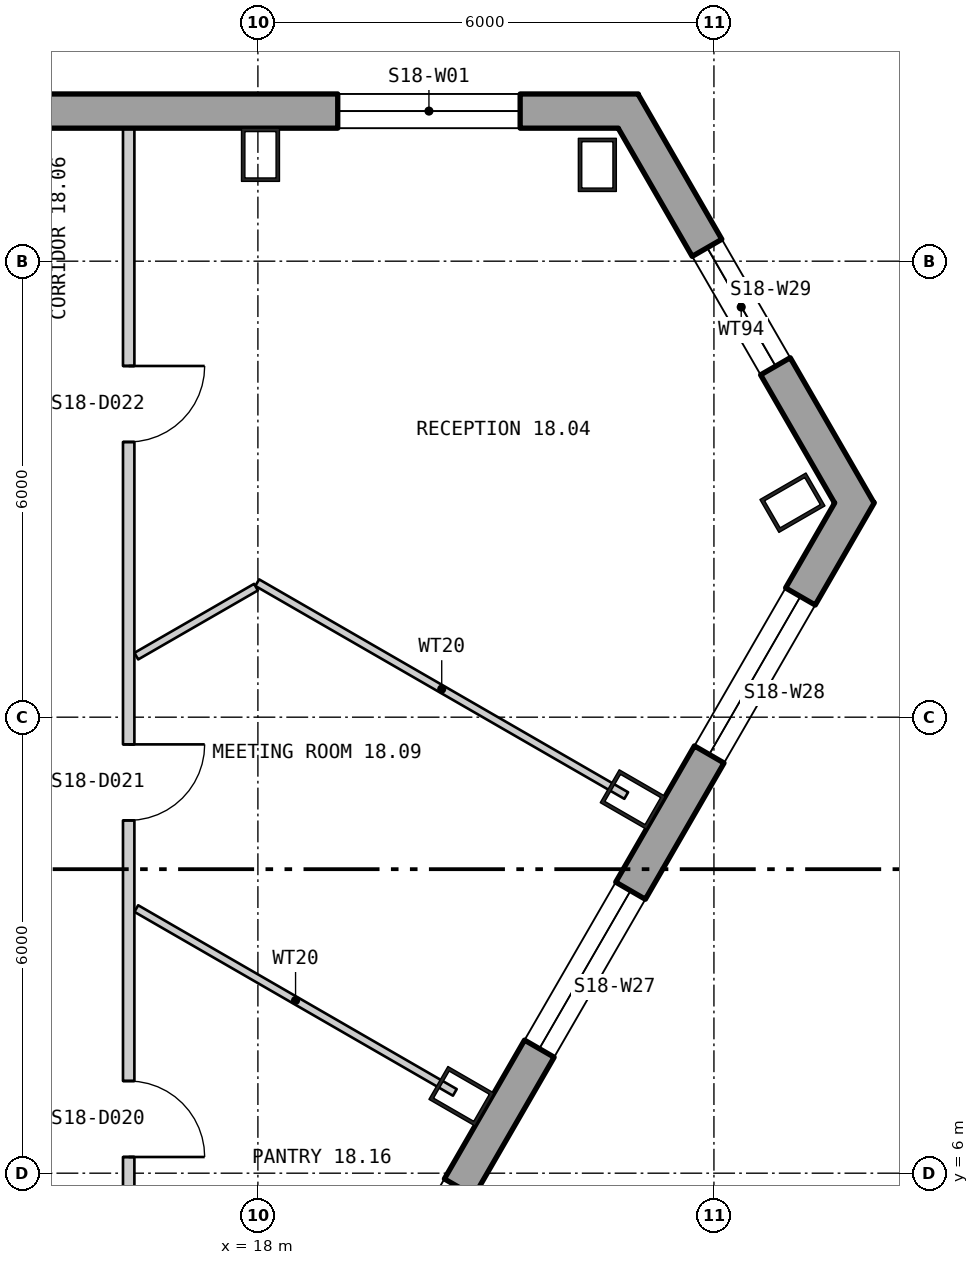
"""IFC4 building model, lengths in metres.
Left out: names, types, materials, properties, quantities, classifications, styles, units other than length and angle.
Written with IfcOpenShell. Run it as: python <this file> out.ifc"""

import sys

from ifc_helpers import new_model, si_unit, direction, frame, frame_2d, origin, origin_2d, place, context, subcontext, project, spatial, polyline, rectangle, hollow_rectangle, outline, extrude, element, fill, save


model = new_model("IFC4")
c1 = context("Model", 3, precision=1e-05, world=origin(), true_north=direction((0.0, 1.0)))
c2 = subcontext(c1, "Body", "Model", "MODEL_VIEW")
j1 = project(units=[si_unit("LENGTHUNIT", "METRE"), si_unit("PLANEANGLEUNIT", "RADIAN")], contexts=[c1])
p1 = place(None, origin())
s1 = spatial("IfcSite", under=j1, at=p1, CompositionType="ELEMENT")
p2 = place(p1, origin())
s2 = spatial("IfcBuilding", under=s1, at=p2, CompositionType="ELEMENT")
p3 = place(p2, frame((0.0, 0.0, 245.4)))
s3 = spatial("IfcBuildingStorey", under=s2, at=p3, CompositionType="ELEMENT", Elevation=245.4)
for number, where, z_axis, x_axis in (
    (1, (22.466, 19.267, 0.0), (0.0, 0.0, 1.0), (-1.0, 0.0, 0.0)),
    (2, (18.034, 19.4, 0.0), (0.0, 0.0, 1.0), (-1.0, 0.0, 0.0)),
    (3, (20.678, 7.013, 0.0), (0.0, 0.0, 1.0), (0.5, 0.866, 0.0)),
    (4, (22.932, 10.917, 0.0), (0.0, 0.0, 1.0), (0.5, 0.866, 0.0)),
    (5, (25.033, 14.822, 0.0), (0.0, 0.0, 1.0), (-0.5, 0.866, 0.0)),
):
    element("IfcColumn", number, at=place(p3, frame(where, z_axis=z_axis, x_axis=x_axis)), inside=s3, PredefinedType="COLUMN", context=c2, shape_type="SweptSolid", body=[
        extrude(hollow_rectangle(XDim=0.5, YDim=0.7, WallThickness=0.045, at=origin_2d()), origin(), (0.0, 0.0, 1.0), 3.9),
    ])
p4 = place(p3, frame((22.875, 19.975, -0.4), z_axis=(0.0, 0.0, 1.0), x_axis=(-1.0, 0.0, 0.0)))
e6 = element("IfcWall", 6, at=p4, inside=s3, PredefinedType="SOLIDWALL", context=c2, shape_type="SweptSolid", body=[
    extrude(outline(polyline([(-0.13, -0.225), (45.88, -0.225), (45.62, 0.225), (0.13, 0.225), (-0.13, -0.225)])), origin(), (0.0, 0.0, 1.0), 3.9),
])
p5 = place(p4, frame((1.425, 0.0, 1.3)))
e7 = element("IfcOpeningElement", 7, at=p5, cuts=e6, PredefinedType="OPENING", context=c2, shape_type="SweptSolid", body=[
    extrude(rectangle(XDim=2.4, YDim=2.0, at=frame_2d((1.2, 1.0))), frame((0.0, 0.235, 0.0), z_axis=(0.0, -1.0, 0.0), x_axis=(1.0, 0.0, 0.0)), (0.0, 0.0, 1.0), 0.47),
])
p6 = place(p4, frame((14.912, 0.0, 1.3)))
e8 = element("IfcOpeningElement", 8, at=p6, cuts=e6, PredefinedType="OPENING", context=c2, shape_type="SweptSolid", body=[
    extrude(rectangle(XDim=2.4, YDim=2.0, at=frame_2d((1.2, 1.0))), frame((0.0, 0.235, 0.0), z_axis=(0.0, -1.0, 0.0), x_axis=(1.0, 0.0, 0.0)), (0.0, 0.0, 1.0), 0.47),
])
p7 = place(p4, frame((19.421, 0.0, 1.3)))
e9 = element("IfcOpeningElement", 9, at=p7, cuts=e6, PredefinedType="OPENING", context=c2, shape_type="SweptSolid", body=[
    extrude(rectangle(XDim=2.4, YDim=2.0, at=frame_2d((1.2, 1.0))), frame((0.0, 0.235, 0.0), z_axis=(0.0, -1.0, 0.0), x_axis=(1.0, 0.0, 0.0)), (0.0, 0.0, 1.0), 0.47),
])
p8 = place(p4, frame((23.929, 0.0, 1.3)))
e10 = element("IfcOpeningElement", 10, at=p8, cuts=e6, PredefinedType="OPENING", context=c2, shape_type="SweptSolid", body=[
    extrude(rectangle(XDim=2.4, YDim=2.0, at=frame_2d((1.2, 1.0))), frame((0.0, 0.235, 0.0), z_axis=(0.0, -1.0, 0.0), x_axis=(1.0, 0.0, 0.0)), (0.0, 0.0, 1.0), 0.47),
])
p9 = place(p4, frame((28.438, 0.0, 1.3)))
e11 = element("IfcOpeningElement", 11, at=p9, cuts=e6, PredefinedType="OPENING", context=c2, shape_type="SweptSolid", body=[
    extrude(rectangle(XDim=2.4, YDim=2.0, at=frame_2d((1.2, 1.0))), frame((0.0, 0.235, 0.0), z_axis=(0.0, -1.0, 0.0), x_axis=(1.0, 0.0, 0.0)), (0.0, 0.0, 1.0), 0.47),
])
p10 = place(p4, frame((32.947, 0.0, 1.3)))
e12 = element("IfcOpeningElement", 12, at=p10, cuts=e6, PredefinedType="OPENING", context=c2, shape_type="SweptSolid", body=[
    extrude(rectangle(XDim=2.4, YDim=2.0, at=frame_2d((1.2, 1.0))), frame((0.0, 0.235, 0.0), z_axis=(0.0, -1.0, 0.0), x_axis=(1.0, 0.0, 0.0)), (0.0, 0.0, 1.0), 0.47),
])
p11 = place(p4, frame((41.925, 0.0, 1.3)))
e13 = element("IfcOpeningElement", 13, at=p11, cuts=e6, PredefinedType="OPENING", context=c2, shape_type="SweptSolid", body=[
    extrude(rectangle(XDim=2.4, YDim=2.0, at=frame_2d((1.2, 1.0))), frame((0.0, 0.235, 0.0), z_axis=(0.0, -1.0, 0.0), x_axis=(1.0, 0.0, 0.0)), (0.0, 0.0, 1.0), 0.47),
])
p12 = place(p3, frame((2.975, -24.799, -0.18), z_axis=(0.0, 0.0, 1.0), x_axis=(0.500000335318, 0.866025210188, 0.0)))
e14 = element("IfcWall", 14, at=p12, inside=s3, PredefinedType="SOLIDWALL", context=c2, shape_type="SweptSolid", body=[
    extrude(outline(polyline([(-0.13, -0.225), (45.88, -0.225), (45.62, 0.225), (0.13, 0.225), (-0.13, -0.225)])), origin(), (0.0, 0.0, 1.0), 3.68),
])
p13 = place(p12, frame((1.425, 0.0, 1.08)))
e15 = element("IfcOpeningElement", 15, at=p13, cuts=e14, PredefinedType="OPENING", context=c2, shape_type="SweptSolid", body=[
    extrude(rectangle(XDim=2.4, YDim=2.0, at=frame_2d((1.2, 1.0))), frame((0.0, 0.235, 0.0), z_axis=(0.0, -1.0, 0.0), x_axis=(1.0, 0.0, 0.0)), (0.0, 0.0, 1.0), 0.47),
])
p14 = place(p12, frame((5.895, 0.0, 1.08)))
e16 = element("IfcOpeningElement", 16, at=p14, cuts=e14, PredefinedType="OPENING", context=c2, shape_type="SweptSolid", body=[
    extrude(rectangle(XDim=2.4, YDim=2.0, at=frame_2d((1.2, 1.0))), frame((0.0, 0.235, 0.0), z_axis=(0.0, -1.0, 0.0), x_axis=(1.0, 0.0, 0.0)), (0.0, 0.0, 1.0), 0.47),
])
p15 = place(p12, frame((10.403, 0.0, 1.08)))
e17 = element("IfcOpeningElement", 17, at=p15, cuts=e14, PredefinedType="OPENING", context=c2, shape_type="SweptSolid", body=[
    extrude(rectangle(XDim=2.4, YDim=2.0, at=frame_2d((1.2, 1.0))), frame((0.0, 0.235, 0.0), z_axis=(0.0, -1.0, 0.0), x_axis=(1.0, 0.0, 0.0)), (0.0, 0.0, 1.0), 0.47),
])
p16 = place(p12, frame((14.912, 0.0, 1.08)))
e18 = element("IfcOpeningElement", 18, at=p16, cuts=e14, PredefinedType="OPENING", context=c2, shape_type="SweptSolid", body=[
    extrude(rectangle(XDim=2.4, YDim=2.0, at=frame_2d((1.2, 1.0))), frame((0.0, 0.235, 0.0), z_axis=(0.0, -1.0, 0.0), x_axis=(1.0, 0.0, 0.0)), (0.0, 0.0, 1.0), 0.47),
])
p17 = place(p12, frame((19.421, 0.0, 1.08)))
e19 = element("IfcOpeningElement", 19, at=p17, cuts=e14, PredefinedType="OPENING", context=c2, shape_type="SweptSolid", body=[
    extrude(rectangle(XDim=2.4, YDim=2.0, at=frame_2d((1.2, 1.0))), frame((0.0, 0.235, 0.0), z_axis=(0.0, -1.0, 0.0), x_axis=(1.0, 0.0, 0.0)), (0.0, 0.0, 1.0), 0.47),
])
p18 = place(p12, frame((23.929, 0.0, 1.08)))
e20 = element("IfcOpeningElement", 20, at=p18, cuts=e14, PredefinedType="OPENING", context=c2, shape_type="SweptSolid", body=[
    extrude(rectangle(XDim=2.4, YDim=2.0, at=frame_2d((1.2, 1.0))), frame((0.0, 0.235, 0.0), z_axis=(0.0, -1.0, 0.0), x_axis=(1.0, 0.0, 0.0)), (0.0, 0.0, 1.0), 0.47),
])
p19 = place(p12, frame((28.438, 0.0, 1.08)))
e21 = element("IfcOpeningElement", 21, at=p19, cuts=e14, PredefinedType="OPENING", context=c2, shape_type="SweptSolid", body=[
    extrude(rectangle(XDim=2.4, YDim=2.0, at=frame_2d((1.2, 1.0))), frame((0.0, 0.235, 0.0), z_axis=(0.0, -1.0, 0.0), x_axis=(1.0, 0.0, 0.0)), (0.0, 0.0, 1.0), 0.47),
])
p20 = place(p12, frame((32.947, 0.0, 1.08)))
e22 = element("IfcOpeningElement", 22, at=p20, cuts=e14, PredefinedType="OPENING", context=c2, shape_type="SweptSolid", body=[
    extrude(rectangle(XDim=2.4, YDim=2.0, at=frame_2d((1.2, 1.0))), frame((0.0, 0.235, 0.0), z_axis=(0.0, -1.0, 0.0), x_axis=(1.0, 0.0, 0.0)), (0.0, 0.0, 1.0), 0.47),
])
p21 = place(p12, frame((37.455, 0.0, 1.08)))
e23 = element("IfcOpeningElement", 23, at=p21, cuts=e14, PredefinedType="OPENING", context=c2, shape_type="SweptSolid", body=[
    extrude(rectangle(XDim=2.4, YDim=2.0, at=frame_2d((1.2, 1.0))), frame((0.0, 0.235, 0.0), z_axis=(0.0, -1.0, 0.0), x_axis=(1.0, 0.0, 0.0)), (0.0, 0.0, 1.0), 0.47),
])
p22 = place(p12, frame((41.925, 0.0, 1.08)))
e24 = element("IfcOpeningElement", 24, at=p22, cuts=e14, PredefinedType="OPENING", context=c2, shape_type="SweptSolid", body=[
    extrude(rectangle(XDim=2.4, YDim=2.0, at=frame_2d((1.2, 1.0))), frame((0.0, 0.235, 0.0), z_axis=(0.0, -1.0, 0.0), x_axis=(1.0, 0.0, 0.0)), (0.0, 0.0, 1.0), 0.47),
])
p23 = place(p3, frame((25.846, 14.82, -0.4), z_axis=(0.0, 0.0, 1.0), x_axis=(-0.500001772576, 0.866024380385, 0.0)))
e25 = element("IfcWall", 25, at=p23, inside=s3, PredefinedType="SOLIDWALL", context=c2, shape_type="SweptSolid", body=[
    extrude(outline(polyline([(-0.13, -0.225), (6.08, -0.225), (5.82, 0.225), (0.13, 0.225), (-0.13, -0.225)])), origin(), (0.0, 0.0, 1.0), 3.9),
])
p24 = place(p23, frame((2.075, 0.0, 1.3)))
e26 = element("IfcOpeningElement", 26, at=p24, cuts=e25, PredefinedType="OPENING", context=c2, shape_type="SweptSolid", body=[
    extrude(rectangle(XDim=1.8, YDim=2.0, at=frame_2d((0.9, 1.0))), frame((0.0, 0.235, 0.0), z_axis=(0.0, -1.0, 0.0), x_axis=(1.0, 0.0, 0.0)), (0.0, 0.0, 1.0), 0.47),
])
p25 = place(p3, frame((16.3, 2.125, 0.0), z_axis=(0.0, 0.0, 1.0), x_axis=(0.0, 1.0, 0.0)))
e27 = element("IfcWall", 27, at=p25, inside=s3, PredefinedType="PARTITIONING", context=c2, shape_type="SweptSolid", body=[
    extrude(rectangle(XDim=17.622, YDim=0.15, at=frame_2d((8.811, 0.0))), origin(), (0.0, 0.0, 1.0), 3.7),
])
p26 = place(p25, frame((4.088, 0.0, 0.0)))
e28 = element("IfcOpeningElement", 28, at=p26, cuts=e27, PredefinedType="OPENING", context=c2, shape_type="SweptSolid", body=[
    extrude(rectangle(XDim=1.0, YDim=2.1, at=frame_2d((0.5, 1.05))), frame((0.0, 0.085, 0.0), z_axis=(0.0, -1.0, 0.0), x_axis=(1.0, 0.0, 0.0)), (0.0, 0.0, 1.0), 0.17),
])
p27 = place(p25, frame((8.517, 0.0, 0.0)))
e29 = element("IfcOpeningElement", 29, at=p27, cuts=e27, PredefinedType="OPENING", context=c2, shape_type="SweptSolid", body=[
    extrude(rectangle(XDim=1.0, YDim=2.1, at=frame_2d((0.5, 1.05))), frame((0.0, 0.085, 0.0), z_axis=(0.0, -1.0, 0.0), x_axis=(1.0, 0.0, 0.0)), (0.0, 0.0, 1.0), 0.17),
])
p28 = place(p25, frame((13.496, 0.0, 0.0)))
e30 = element("IfcOpeningElement", 30, at=p28, cuts=e27, PredefinedType="OPENING", context=c2, shape_type="SweptSolid", body=[
    extrude(rectangle(XDim=1.0, YDim=2.1, at=frame_2d((0.5, 1.05))), frame((0.0, 0.085, 0.0), z_axis=(0.0, -1.0, 0.0), x_axis=(1.0, 0.0, 0.0)), (0.0, 0.0, 1.0), 0.17),
])
p29 = place(p3, frame((16.4, 12.803, 0.0), z_axis=(0.0, 0.0, 1.0), x_axis=(0.866341220787, 0.499452589508, 0.0)))
e31 = element("IfcWall", 31, at=p29, inside=s3, PredefinedType="PARTITIONING", context=c2, shape_type="SweptSolid", body=[
    extrude(rectangle(XDim=1.818, YDim=0.1, at=frame_2d((0.909, 0.0))), origin(), (0.0, 0.0, 1.0), 3.7),
])
p30 = place(p3, frame((16.4, 9.482, 0.0), z_axis=(0.0, 0.0, 1.0), x_axis=(0.866085797004, -0.499895381282, 0.0)))
e32 = element("IfcWall", 32, at=p30, inside=s3, PredefinedType="PARTITIONING", context=c2, shape_type="SweptSolid", body=[
    extrude(rectangle(XDim=4.839, YDim=0.1, at=frame_2d((2.42, 0.0))), origin(), (0.0, 0.0, 1.0), 3.7),
])
p31 = place(p3, frame((17.991, 13.77, 0.0), z_axis=(0.0, 0.0, 1.0), x_axis=(0.866182615826, -0.499727601839, 0.0)))
e33 = element("IfcWall", 33, at=p31, inside=s3, PredefinedType="PARTITIONING", context=c2, shape_type="SweptSolid", body=[
    extrude(rectangle(XDim=5.605, YDim=0.1, at=frame_2d((2.803, 0.0))), origin(), (0.0, 0.0, 1.0), 3.7),
])
p32 = place(p5, origin())
e34 = element("IfcWindow", 34, at=p32, inside=s3, PartitioningType="SINGLE_PANEL", PredefinedType="WINDOW", context=c2, shape_type="SweptSolid", body=[
    extrude(rectangle(XDim=2.4, YDim=2.0, at=frame_2d((1.2, 1.0))), frame((0.0, 0.105, 0.0), z_axis=(0.0, -1.0, 0.0), x_axis=(1.0, 0.0, 0.0)), (0.0, 0.0, 1.0), 0.06),
])
fill(e7, e34)
p33 = place(p20, origin())
e35 = element("IfcWindow", 35, at=p33, inside=s3, PartitioningType="SINGLE_PANEL", PredefinedType="WINDOW", context=c2, shape_type="SweptSolid", body=[
    extrude(rectangle(XDim=2.4, YDim=2.0, at=frame_2d((1.2, 1.0))), frame((0.0, 0.105, 0.0), z_axis=(0.0, -1.0, 0.0), x_axis=(1.0, 0.0, 0.0)), (0.0, 0.0, 1.0), 0.06),
])
fill(e22, e35)
p34 = place(p21, origin())
e36 = element("IfcWindow", 36, at=p34, inside=s3, PartitioningType="SINGLE_PANEL", PredefinedType="WINDOW", context=c2, shape_type="SweptSolid", body=[
    extrude(rectangle(XDim=2.4, YDim=2.0, at=frame_2d((1.2, 1.0))), frame((0.0, 0.105, 0.0), z_axis=(0.0, -1.0, 0.0), x_axis=(1.0, 0.0, 0.0)), (0.0, 0.0, 1.0), 0.06),
])
fill(e23, e36)
p35 = place(p22, origin())
e37 = element("IfcWindow", 37, at=p35, inside=s3, PartitioningType="SINGLE_PANEL", PredefinedType="WINDOW", context=c2, shape_type="SweptSolid", body=[
    extrude(rectangle(XDim=2.4, YDim=2.0, at=frame_2d((1.2, 1.0))), frame((0.0, 0.105, 0.0), z_axis=(0.0, -1.0, 0.0), x_axis=(1.0, 0.0, 0.0)), (0.0, 0.0, 1.0), 0.06),
])
fill(e24, e37)
p36 = place(p24, origin())
e38 = element("IfcWindow", 38, at=p36, inside=s3, PartitioningType="SINGLE_PANEL", PredefinedType="WINDOW", context=c2, shape_type="SweptSolid", body=[
    extrude(rectangle(XDim=1.8, YDim=2.0, at=frame_2d((0.9, 1.0))), frame((0.0, 0.105, 0.0), z_axis=(0.0, -1.0, 0.0), x_axis=(1.0, 0.0, 0.0)), (0.0, 0.0, 1.0), 0.06),
])
fill(e26, e38)
p37 = place(p26, origin())
e39 = element("IfcDoor", 39, at=p37, inside=s3, OperationType="SINGLE_SWING_LEFT", PredefinedType="DOOR", context=c2, shape_type="SweptSolid", body=[
    extrude(rectangle(XDim=1.0, YDim=2.1, at=frame_2d((0.5, 1.05))), frame((0.0, 0.025, 0.0), z_axis=(0.0, -1.0, 0.0), x_axis=(1.0, 0.0, 0.0)), (0.0, 0.0, 1.0), 0.05),
])
fill(e28, e39)
p38 = place(p27, origin())
e40 = element("IfcDoor", 40, at=p38, inside=s3, OperationType="SINGLE_SWING_RIGHT", PredefinedType="DOOR", context=c2, shape_type="SweptSolid", body=[
    extrude(rectangle(XDim=1.0, YDim=2.1, at=frame_2d((0.5, 1.05))), frame((0.0, 0.025, 0.0), z_axis=(0.0, -1.0, 0.0), x_axis=(1.0, 0.0, 0.0)), (0.0, 0.0, 1.0), 0.05),
])
fill(e29, e40)
p39 = place(p28, origin())
e41 = element("IfcDoor", 41, at=p39, inside=s3, OperationType="SINGLE_SWING_RIGHT", PredefinedType="DOOR", context=c2, shape_type="SweptSolid", body=[
    extrude(rectangle(XDim=1.0, YDim=2.1, at=frame_2d((0.5, 1.05))), frame((0.0, 0.025, 0.0), z_axis=(0.0, -1.0, 0.0), x_axis=(1.0, 0.0, 0.0)), (0.0, 0.0, 1.0), 0.05),
])
fill(e30, e41)
save(model, sys.argv[1])
